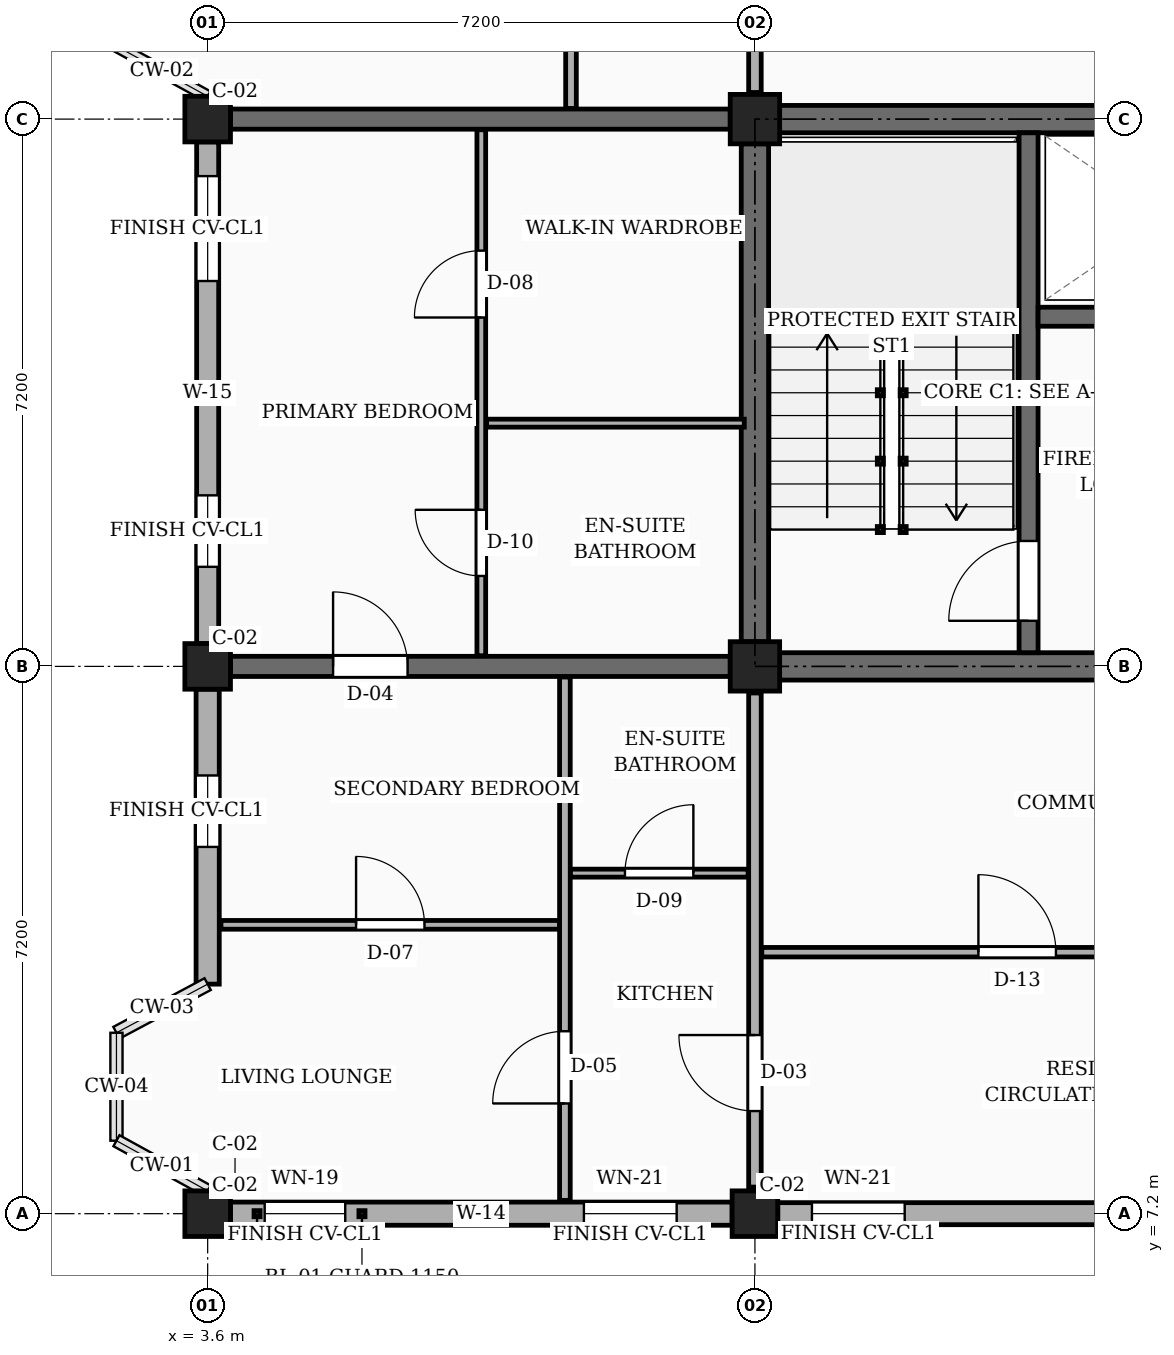
"""IFC4 building model, lengths in metres.
Left out: names, types, materials, properties, quantities, classifications, styles, units other than length and angle.
Written with IfcOpenShell. Run it as: python <this file> out.ifc"""

import sys

from ifc_helpers import new_model, si_unit, direction, frame, frame_2d, origin, origin_2d, place, context, subcontext, project, spatial, rectangle, extrude, element, fill, save


model = new_model("IFC4")
c1 = context("Model", 3, precision=1e-05, world=origin(), true_north=direction((0.0, 1.0)))
c2 = subcontext(c1, "Body", "Model", "MODEL_VIEW")
j1 = project(units=[si_unit("LENGTHUNIT", "METRE"), si_unit("PLANEANGLEUNIT", "RADIAN")], contexts=[c1])
p1 = place(None, origin())
s1 = spatial("IfcSite", under=j1, at=p1, CompositionType="ELEMENT")
p2 = place(p1, origin())
s2 = spatial("IfcBuilding", under=s1, at=p2, CompositionType="ELEMENT")
p3 = place(p2, frame((0.0, 0.0, 7.65)))
s3 = spatial("IfcBuildingStorey", under=s2, at=p3, CompositionType="ELEMENT", Elevation=7.65)
for number, where, z_axis, x_axis in (
    (1, (3.6, 7.2, 0.0), (0.0, 0.0, 1.0), (1.0, 0.0, 0.0)),
    (2, (3.6, 14.4, 0.0), (0.0, 0.0, 1.0), (1.0, 0.0, 0.0)),
    (3, (3.6, 21.6, 0.0), (0.0, 0.0, 1.0), (1.0, 0.0, 0.0)),
    (4, (10.8, 7.2, 0.0), (0.0, 0.0, 1.0), (1.0, 0.0, 0.0)),
):
    element("IfcColumn", number, at=place(p3, frame(where, z_axis=z_axis, x_axis=x_axis)), inside=s3, PredefinedType="COLUMN", context=c2, shape_type="SweptSolid", body=[
        extrude(rectangle(XDim=0.6, YDim=0.6, at=origin_2d()), origin(), (0.0, 0.0, 1.0), 3.15),
    ])
for number, where, z_axis, x_axis in (
    (5, (10.8, 14.4, 0.0), (0.0, 0.0, 1.0), (1.0, 0.0, 0.0)),
    (6, (10.8, 21.6, 0.0), (0.0, 0.0, 1.0), (1.0, 0.0, 0.0)),
):
    element("IfcColumn", number, at=place(p3, frame(where, z_axis=z_axis, x_axis=x_axis)), inside=s3, PredefinedType="COLUMN", context=c2, shape_type="SweptSolid", body=[
        extrude(rectangle(XDim=0.65, YDim=0.65, at=origin_2d()), origin(), (0.0, 0.0, 1.0), 3.15),
    ])
p4 = place(p3, frame((3.9, 14.4, 0.0), z_axis=(0.0, 0.0, 1.0), x_axis=(1.0, 0.0, 0.0)))
e7 = element("IfcWall", 7, at=p4, inside=s3, PredefinedType="SOLIDWALL", context=c2, shape_type="SweptSolid", body=[
    extrude(rectangle(XDim=6.575, YDim=0.265, at=frame_2d((3.288, 0.0))), origin(), (0.0, 0.0, 1.0), 2.17),
])
p5 = place(p4, frame((1.35, 0.0, 0.0)))
e8 = element("IfcOpeningElement", 8, at=p5, cuts=e7, PredefinedType="OPENING", context=c2, shape_type="SweptSolid", body=[
    extrude(rectangle(XDim=0.98, YDim=2.12, at=frame_2d((0.49, 1.06))), frame((0.0, 0.143, 0.0), z_axis=(0.0, -1.0, 0.0), x_axis=(1.0, 0.0, 0.0)), (0.0, 0.0, 1.0), 0.285),
])
p6 = place(p3, frame((3.9, 21.6, 0.0), z_axis=(0.0, 0.0, 1.0), x_axis=(1.0, 0.0, 0.0)))
e9 = element("IfcWall", 9, at=p6, inside=s3, PredefinedType="SOLIDWALL", context=c2, shape_type="SweptSolid", body=[
    extrude(rectangle(XDim=6.575, YDim=0.265, at=frame_2d((3.288, 0.0))), origin(), (0.0, 0.0, 1.0), 2.17),
])
p7 = place(p3, frame((3.9, 7.2, 0.0), z_axis=(0.0, 0.0, 1.0), x_axis=(1.0, 0.0, 0.0)))
e10 = element("IfcWall", 10, at=p7, inside=s3, PredefinedType="SOLIDWALL", context=c2, shape_type="SweptSolid", body=[
    extrude(rectangle(XDim=6.6, YDim=0.305, at=frame_2d((3.3, 0.0))), origin(), (0.0, 0.0, 1.0), 2.44),
])
p8 = place(p7, frame((0.45, 0.0, 0.78)))
e11 = element("IfcOpeningElement", 11, at=p8, cuts=e10, PredefinedType="OPENING", context=c2, shape_type="SweptSolid", body=[
    extrude(rectangle(XDim=1.06, YDim=1.36, at=frame_2d((0.53, 0.68))), frame((0.0, 0.163, 0.0), z_axis=(0.0, -1.0, 0.0), x_axis=(1.0, 0.0, 0.0)), (0.0, 0.0, 1.0), 0.325),
])
p9 = place(p7, frame((4.65, 0.0, 0.78)))
e12 = element("IfcOpeningElement", 12, at=p9, cuts=e10, PredefinedType="OPENING", context=c2, shape_type="SweptSolid", body=[
    extrude(rectangle(XDim=1.22, YDim=1.36, at=frame_2d((0.61, 0.68))), frame((0.0, 0.163, 0.0), z_axis=(0.0, -1.0, 0.0), x_axis=(1.0, 0.0, 0.0)), (0.0, 0.0, 1.0), 0.325),
])
p10 = place(p3, frame((11.1, 7.2, 0.0), z_axis=(0.0, 0.0, 1.0), x_axis=(1.0, 0.0, 0.0)))
e13 = element("IfcWall", 13, at=p10, inside=s3, PredefinedType="SOLIDWALL", context=c2, shape_type="SweptSolid", body=[
    extrude(rectangle(XDim=6.6, YDim=0.29, at=frame_2d((3.3, 0.0))), origin(), (0.0, 0.0, 1.0), 2.44),
])
p11 = place(p10, frame((0.45, 0.0, 0.78)))
e14 = element("IfcOpeningElement", 14, at=p11, cuts=e13, PredefinedType="OPENING", context=c2, shape_type="SweptSolid", body=[
    extrude(rectangle(XDim=1.22, YDim=1.36, at=frame_2d((0.61, 0.68))), frame((0.0, 0.155, 0.0), z_axis=(0.0, -1.0, 0.0), x_axis=(1.0, 0.0, 0.0)), (0.0, 0.0, 1.0), 0.31),
])
p12 = place(p10, frame((4.65, 0.0, 0.78)))
e15 = element("IfcOpeningElement", 15, at=p12, cuts=e13, PredefinedType="OPENING", context=c2, shape_type="SweptSolid", body=[
    extrude(rectangle(XDim=1.38, YDim=1.36, at=frame_2d((0.69, 0.68))), frame((0.0, 0.155, 0.0), z_axis=(0.0, -1.0, 0.0), x_axis=(1.0, 0.0, 0.0)), (0.0, 0.0, 1.0), 0.31),
])
p13 = place(p3, frame((3.6, 21.3, 0.0), z_axis=(0.0, 0.0, 1.0), x_axis=(0.0, -1.0, 0.0)))
e16 = element("IfcWall", 16, at=p13, inside=s3, PredefinedType="SOLIDWALL", context=c2, shape_type="SweptSolid", body=[
    extrude(rectangle(XDim=6.6, YDim=0.29, at=frame_2d((3.3, 0.0))), origin(), (0.0, 0.0, 1.0), 2.44),
])
p14 = place(p13, frame((0.45, 0.0, 0.78)))
e17 = element("IfcOpeningElement", 17, at=p14, cuts=e16, PredefinedType="OPENING", context=c2, shape_type="SweptSolid", body=[
    extrude(rectangle(XDim=1.38, YDim=1.36, at=frame_2d((0.69, 0.68))), frame((0.0, 0.155, 0.0), z_axis=(0.0, -1.0, 0.0), x_axis=(1.0, 0.0, 0.0)), (0.0, 0.0, 1.0), 0.31),
])
p15 = place(p13, frame((4.65, 0.0, 0.78)))
e18 = element("IfcOpeningElement", 18, at=p15, cuts=e16, PredefinedType="OPENING", context=c2, shape_type="SweptSolid", body=[
    extrude(rectangle(XDim=0.94, YDim=1.44, at=frame_2d((0.47, 0.72))), frame((0.0, 0.155, 0.0), z_axis=(0.0, -1.0, 0.0), x_axis=(1.0, 0.0, 0.0)), (0.0, 0.0, 1.0), 0.31),
])
p16 = place(p3, frame((3.6, 14.1, 0.0), z_axis=(0.0, 0.0, 1.0), x_axis=(0.0, -1.0, 0.0)))
e19 = element("IfcWall", 19, at=p16, inside=s3, PredefinedType="SOLIDWALL", context=c2, shape_type="SweptSolid", body=[
    extrude(rectangle(XDim=3.88, YDim=0.305, at=frame_2d((1.94, 0.0))), origin(), (0.0, 0.0, 1.0), 2.44),
])
p17 = place(p16, frame((1.135, 0.0, 0.78)))
e20 = element("IfcOpeningElement", 20, at=p17, cuts=e19, PredefinedType="OPENING", context=c2, shape_type="SweptSolid", body=[
    extrude(rectangle(XDim=0.94, YDim=1.44, at=frame_2d((0.47, 0.72))), frame((0.0, 0.163, 0.0), z_axis=(0.0, -1.0, 0.0), x_axis=(1.0, 0.0, 0.0)), (0.0, 0.0, 1.0), 0.325),
])
p18 = place(p3, frame((10.8, 14.725, 0.0), z_axis=(0.0, 0.0, 1.0), x_axis=(0.0, 1.0, 0.0)))
e21 = element("IfcWall", 21, at=p18, inside=s3, PredefinedType="SHEAR", context=c2, shape_type="SweptSolid", body=[
    extrude(rectangle(XDim=6.55, YDim=0.36, at=frame_2d((3.275, 0.0))), origin(), (0.0, 0.0, 1.0), 2.87),
])
for number, where, z_axis, x_axis in (
    (22, (11.125, 21.6, 0.0), (0.0, 0.0, 1.0), (1.0, 0.0, 0.0)),
    (23, (11.125, 14.4, 0.0), (0.0, 0.0, 1.0), (1.0, 0.0, 0.0)),
):
    element("IfcWall", number, at=place(p3, frame(where, z_axis=z_axis, x_axis=x_axis)), inside=s3, PredefinedType="SHEAR", context=c2, shape_type="SweptSolid", body=[
        extrude(rectangle(XDim=6.55, YDim=0.36, at=frame_2d((3.275, 0.0))), origin(), (0.0, 0.0, 1.0), 2.87),
    ])
p19 = place(p3, frame((14.4, 14.58, 0.0), z_axis=(0.0, 0.0, 1.0), x_axis=(0.0, 1.0, 0.0)))
e24 = element("IfcWall", 24, at=p19, inside=s3, PredefinedType="SHEAR", context=c2, shape_type="SweptSolid", body=[
    extrude(rectangle(XDim=6.84, YDim=0.25, at=frame_2d((3.42, 0.0))), origin(), (0.0, 0.0, 1.0), 2.87),
])
p20 = place(p19, frame((0.42, 0.0, 0.0)))
e25 = element("IfcOpeningElement", 25, at=p20, cuts=e24, PredefinedType="OPENING", context=c2, shape_type="SweptSolid", body=[
    extrude(rectangle(XDim=1.05, YDim=2.15, at=frame_2d((0.525, 1.075))), frame((0.0, 0.135, 0.0), z_axis=(0.0, -1.0, 0.0), x_axis=(1.0, 0.0, 0.0)), (0.0, 0.0, 1.0), 0.27),
])
p21 = place(p3, frame((14.525, 19.0, 0.0), z_axis=(0.0, 0.0, 1.0), x_axis=(1.0, 0.0, 0.0)))
e26 = element("IfcWall", 26, at=p21, inside=s3, PredefinedType="SHEAR", context=c2, shape_type="SweptSolid", body=[
    extrude(rectangle(XDim=3.295, YDim=0.25, at=frame_2d((1.647, 0.0))), origin(), (0.0, 0.0, 1.0), 2.87),
])
p22 = place(p21, frame((1.1, 0.0, 0.0)))
e27 = element("IfcOpeningElement", 27, at=p22, cuts=e26, PredefinedType="OPENING", context=c2, shape_type="SweptSolid", body=[
    extrude(rectangle(XDim=1.1, YDim=2.2, at=frame_2d((0.55, 1.1))), frame((0.0, 0.135, 0.0), z_axis=(0.0, -1.0, 0.0), x_axis=(1.0, 0.0, 0.0)), (0.0, 0.0, 1.0), 0.27),
])
p23 = place(p3, frame((10.8, 7.55, 0.0), z_axis=(0.0, 0.0, 1.0), x_axis=(0.0, 1.0, 0.0)))
e28 = element("IfcWall", 28, at=p23, inside=s3, PredefinedType="PARTITIONING", context=c2, shape_type="SweptSolid", body=[
    extrude(rectangle(XDim=6.5, YDim=0.165, at=frame_2d((3.25, 0.0))), origin(), (0.0, 0.0, 1.0), 2.22),
])
p24 = place(p23, frame((1.0, 0.0, 0.0)))
e29 = element("IfcOpeningElement", 29, at=p24, cuts=e28, PredefinedType="OPENING", context=c2, shape_type="SweptSolid", body=[
    extrude(rectangle(XDim=1.0, YDim=2.15, at=frame_2d((0.5, 1.075))), frame((0.0, 0.093, 0.0), z_axis=(0.0, -1.0, 0.0), x_axis=(1.0, 0.0, 0.0)), (0.0, 0.0, 1.0), 0.185),
])
p25 = place(p3, frame((10.8, 21.95, 0.0), z_axis=(0.0, 0.0, 1.0), x_axis=(0.0, 1.0, 0.0)))
e30 = element("IfcWall", 30, at=p25, inside=s3, PredefinedType="PARTITIONING", context=c2, shape_type="SweptSolid", body=[
    extrude(rectangle(XDim=6.5, YDim=0.165, at=frame_2d((3.25, 0.0))), origin(), (0.0, 0.0, 1.0), 2.22),
])
p26 = place(p25, frame((1.0, 0.0, 0.0)))
e31 = element("IfcOpeningElement", 31, at=p26, cuts=e30, PredefinedType="OPENING", context=c2, shape_type="SweptSolid", body=[
    extrude(rectangle(XDim=0.94, YDim=2.12, at=frame_2d((0.47, 1.06))), frame((0.0, 0.093, 0.0), z_axis=(0.0, -1.0, 0.0), x_axis=(1.0, 0.0, 0.0)), (0.0, 0.0, 1.0), 0.185),
])
p27 = place(p3, frame((10.89, 10.64, 0.0), z_axis=(0.0, 0.0, 1.0), x_axis=(1.0, 0.0, 0.0)))
e32 = element("IfcWall", 32, at=p27, inside=s3, PredefinedType="PARTITIONING", context=c2, shape_type="SweptSolid", body=[
    extrude(rectangle(XDim=7.02, YDim=0.125, at=frame_2d((3.51, 0.0))), origin(), (0.0, 0.0, 1.0), 2.305),
])
p28 = place(p27, frame((2.85, 0.0, 0.0)))
e33 = element("IfcOpeningElement", 33, at=p28, cuts=e32, PredefinedType="OPENING", context=c2, shape_type="SweptSolid", body=[
    extrude(rectangle(XDim=1.02, YDim=2.15, at=frame_2d((0.51, 1.075))), frame((0.0, 0.073, 0.0), z_axis=(0.0, -1.0, 0.0), x_axis=(1.0, 0.0, 0.0)), (0.0, 0.0, 1.0), 0.145),
])
p29 = place(p3, frame((3.775, 11.0, 0.0), z_axis=(0.0, 0.0, 1.0), x_axis=(1.0, 0.0, 0.0)))
e34 = element("IfcWall", 34, at=p29, inside=s3, PredefinedType="PARTITIONING", context=c2, shape_type="SweptSolid", body=[
    extrude(rectangle(XDim=4.455, YDim=0.115, at=frame_2d((2.228, 0.0))), origin(), (0.0, 0.0, 1.0), 2.305),
])
p30 = place(p29, frame((1.778, 0.0, 0.0)))
e35 = element("IfcOpeningElement", 35, at=p30, cuts=e34, PredefinedType="OPENING", context=c2, shape_type="SweptSolid", body=[
    extrude(rectangle(XDim=0.9, YDim=2.1, at=frame_2d((0.45, 1.05))), frame((0.0, 0.067, 0.0), z_axis=(0.0, -1.0, 0.0), x_axis=(1.0, 0.0, 0.0)), (0.0, 0.0, 1.0), 0.135),
])
p31 = place(p3, frame((8.37, 11.68, 0.0), z_axis=(0.0, 0.0, 1.0), x_axis=(1.0, 0.0, 0.0)))
e36 = element("IfcWall", 36, at=p31, inside=s3, PredefinedType="PARTITIONING", context=c2, shape_type="SweptSolid", body=[
    extrude(rectangle(XDim=2.34, YDim=0.105, at=frame_2d((1.17, 0.0))), origin(), (0.0, 0.0, 1.0), 2.305),
])
p32 = place(p31, frame((0.72, 0.0, 0.0)))
e37 = element("IfcOpeningElement", 37, at=p32, cuts=e36, PredefinedType="OPENING", context=c2, shape_type="SweptSolid", body=[
    extrude(rectangle(XDim=0.9, YDim=2.05, at=frame_2d((0.45, 1.025))), frame((0.0, 0.062, 0.0), z_axis=(0.0, -1.0, 0.0), x_axis=(1.0, 0.0, 0.0)), (0.0, 0.0, 1.0), 0.125),
])
p33 = place(p3, frame((8.3, 7.375, 0.0), z_axis=(0.0, 0.0, 1.0), x_axis=(0.0, 1.0, 0.0)))
e38 = element("IfcWall", 38, at=p33, inside=s3, PredefinedType="PARTITIONING", context=c2, shape_type="SweptSolid", body=[
    extrude(rectangle(XDim=6.885, YDim=0.14, at=frame_2d((3.442, 0.0))), origin(), (0.0, 0.0, 1.0), 2.305),
])
p34 = place(p33, frame((1.275, 0.0, 0.0)))
e39 = element("IfcOpeningElement", 39, at=p34, cuts=e38, PredefinedType="OPENING", context=c2, shape_type="SweptSolid", body=[
    extrude(rectangle(XDim=0.95, YDim=2.1, at=frame_2d((0.475, 1.05))), frame((0.0, 0.08, 0.0), z_axis=(0.0, -1.0, 0.0), x_axis=(1.0, 0.0, 0.0)), (0.0, 0.0, 1.0), 0.16),
])
p35 = place(p3, frame((7.2, 14.54, 0.0), z_axis=(0.0, 0.0, 1.0), x_axis=(0.0, 1.0, 0.0)))
e40 = element("IfcWall", 40, at=p35, inside=s3, PredefinedType="PARTITIONING", context=c2, shape_type="SweptSolid", body=[
    extrude(rectangle(XDim=6.92, YDim=0.115, at=frame_2d((3.46, 0.0))), origin(), (0.0, 0.0, 1.0), 2.305),
])
p36 = place(p35, frame((1.05, 0.0, 0.0)))
e41 = element("IfcOpeningElement", 41, at=p36, cuts=e40, PredefinedType="OPENING", context=c2, shape_type="SweptSolid", body=[
    extrude(rectangle(XDim=0.87, YDim=2.05, at=frame_2d((0.435, 1.025))), frame((0.0, 0.067, 0.0), z_axis=(0.0, -1.0, 0.0), x_axis=(1.0, 0.0, 0.0)), (0.0, 0.0, 1.0), 0.135),
])
p37 = place(p35, frame((4.45, 0.0, 0.0)))
e42 = element("IfcOpeningElement", 42, at=p37, cuts=e40, PredefinedType="OPENING", context=c2, shape_type="SweptSolid", body=[
    extrude(rectangle(XDim=0.88, YDim=2.08, at=frame_2d((0.44, 1.04))), frame((0.0, 0.067, 0.0), z_axis=(0.0, -1.0, 0.0), x_axis=(1.0, 0.0, 0.0)), (0.0, 0.0, 1.0), 0.135),
])
p38 = place(p3, frame((7.27, 17.6, 0.0), z_axis=(0.0, 0.0, 1.0), x_axis=(1.0, 0.0, 0.0)))
e43 = element("IfcWall", 43, at=p38, inside=s3, PredefinedType="PARTITIONING", context=c2, shape_type="SweptSolid", body=[
    extrude(rectangle(XDim=3.39, YDim=0.105, at=frame_2d((1.695, 0.0))), origin(), (0.0, 0.0, 1.0), 2.305),
])
p39 = place(p3, frame((8.38, 21.74, 0.0), z_axis=(0.0, 0.0, 1.0), x_axis=(0.0, 1.0, 0.0)))
e44 = element("IfcWall", 44, at=p39, inside=s3, PredefinedType="PARTITIONING", context=c2, shape_type="SweptSolid", body=[
    extrude(rectangle(XDim=6.92, YDim=0.14, at=frame_2d((3.46, 0.0))), origin(), (0.0, 0.0, 1.0), 2.305),
])
p40 = place(p39, frame((1.31, 0.0, 0.0)))
e45 = element("IfcOpeningElement", 45, at=p40, cuts=e44, PredefinedType="OPENING", context=c2, shape_type="SweptSolid", body=[
    extrude(rectangle(XDim=0.92, YDim=2.1, at=frame_2d((0.46, 1.05))), frame((0.0, 0.08, 0.0), z_axis=(0.0, -1.0, 0.0), x_axis=(1.0, 0.0, 0.0)), (0.0, 0.0, 1.0), 0.16),
])
p41 = place(p8, origin())
e46 = element("IfcWindow", 46, at=p41, inside=s3, PartitioningType="SINGLE_PANEL", PredefinedType="WINDOW", context=c2, shape_type="SweptSolid", body=[
    extrude(rectangle(XDim=1.06, YDim=1.36, at=frame_2d((0.53, 0.68))), frame((0.0, 0.03, 0.0), z_axis=(0.0, -1.0, 0.0), x_axis=(1.0, 0.0, 0.0)), (0.0, 0.0, 1.0), 0.06),
])
fill(e11, e46)
p42 = place(p9, origin())
e47 = element("IfcWindow", 47, at=p42, inside=s3, PartitioningType="SINGLE_PANEL", PredefinedType="WINDOW", context=c2, shape_type="SweptSolid", body=[
    extrude(rectangle(XDim=1.22, YDim=1.36, at=frame_2d((0.61, 0.68))), frame((0.0, 0.03, 0.0), z_axis=(0.0, -1.0, 0.0), x_axis=(1.0, 0.0, 0.0)), (0.0, 0.0, 1.0), 0.06),
])
fill(e12, e47)
p43 = place(p11, origin())
e48 = element("IfcWindow", 48, at=p43, inside=s3, PartitioningType="SINGLE_PANEL", PredefinedType="WINDOW", context=c2, shape_type="SweptSolid", body=[
    extrude(rectangle(XDim=1.22, YDim=1.36, at=frame_2d((0.61, 0.68))), frame((0.0, 0.03, 0.0), z_axis=(0.0, -1.0, 0.0), x_axis=(1.0, 0.0, 0.0)), (0.0, 0.0, 1.0), 0.06),
])
fill(e14, e48)
p44 = place(p14, origin())
e49 = element("IfcWindow", 49, at=p44, inside=s3, PartitioningType="SINGLE_PANEL", PredefinedType="WINDOW", context=c2, shape_type="SweptSolid", body=[
    extrude(rectangle(XDim=1.38, YDim=1.36, at=frame_2d((0.69, 0.68))), frame((0.0, 0.03, 0.0), z_axis=(0.0, -1.0, 0.0), x_axis=(1.0, 0.0, 0.0)), (0.0, 0.0, 1.0), 0.06),
])
fill(e17, e49)
p45 = place(p15, origin())
e50 = element("IfcWindow", 50, at=p45, inside=s3, PartitioningType="SINGLE_PANEL", PredefinedType="WINDOW", context=c2, shape_type="SweptSolid", body=[
    extrude(rectangle(XDim=0.94, YDim=1.44, at=frame_2d((0.47, 0.72))), frame((0.0, 0.03, 0.0), z_axis=(0.0, -1.0, 0.0), x_axis=(1.0, 0.0, 0.0)), (0.0, 0.0, 1.0), 0.06),
])
fill(e18, e50)
p46 = place(p17, origin())
e51 = element("IfcWindow", 51, at=p46, inside=s3, PartitioningType="SINGLE_PANEL", PredefinedType="WINDOW", context=c2, shape_type="SweptSolid", body=[
    extrude(rectangle(XDim=0.94, YDim=1.44, at=frame_2d((0.47, 0.72))), frame((0.0, 0.03, 0.0), z_axis=(0.0, -1.0, 0.0), x_axis=(1.0, 0.0, 0.0)), (0.0, 0.0, 1.0), 0.06),
])
fill(e20, e51)
p47 = place(p20, origin())
e52 = element("IfcDoor", 52, at=p47, inside=s3, OperationType="SINGLE_SWING_LEFT", PredefinedType="DOOR", context=c2, shape_type="SweptSolid", body=[
    extrude(rectangle(XDim=1.05, YDim=2.15, at=frame_2d((0.525, 1.075))), frame((0.0, 0.025, 0.0), z_axis=(0.0, -1.0, 0.0), x_axis=(1.0, 0.0, 0.0)), (0.0, 0.0, 1.0), 0.05),
])
fill(e25, e52)
p48 = place(p24, origin())
e53 = element("IfcDoor", 53, at=p48, inside=s3, OperationType="SINGLE_SWING_RIGHT", PredefinedType="DOOR", context=c2, shape_type="SweptSolid", body=[
    extrude(rectangle(XDim=1.0, YDim=2.15, at=frame_2d((0.5, 1.075))), frame((0.0, 0.025, 0.0), z_axis=(0.0, -1.0, 0.0), x_axis=(1.0, 0.0, 0.0)), (0.0, 0.0, 1.0), 0.05),
])
fill(e29, e53)
p49 = place(p28, origin())
e54 = element("IfcDoor", 54, at=p49, inside=s3, OperationType="SINGLE_SWING_LEFT", PredefinedType="DOOR", context=c2, shape_type="SweptSolid", body=[
    extrude(rectangle(XDim=1.02, YDim=2.15, at=frame_2d((0.51, 1.075))), frame((0.0, 0.025, 0.0), z_axis=(0.0, -1.0, 0.0), x_axis=(1.0, 0.0, 0.0)), (0.0, 0.0, 1.0), 0.05),
])
fill(e33, e54)
p50 = place(p30, origin())
e55 = element("IfcDoor", 55, at=p50, inside=s3, OperationType="SINGLE_SWING_LEFT", PredefinedType="DOOR", context=c2, shape_type="SweptSolid", body=[
    extrude(rectangle(XDim=0.9, YDim=2.1, at=frame_2d((0.45, 1.05))), frame((0.0, 0.025, 0.0), z_axis=(0.0, -1.0, 0.0), x_axis=(1.0, 0.0, 0.0)), (0.0, 0.0, 1.0), 0.05),
])
fill(e35, e55)
p51 = place(p32, origin())
e56 = element("IfcDoor", 56, at=p51, inside=s3, OperationType="SINGLE_SWING_RIGHT", PredefinedType="DOOR", context=c2, shape_type="SweptSolid", body=[
    extrude(rectangle(XDim=0.9, YDim=2.05, at=frame_2d((0.45, 1.025))), frame((0.0, 0.025, 0.0), z_axis=(0.0, -1.0, 0.0), x_axis=(1.0, 0.0, 0.0)), (0.0, 0.0, 1.0), 0.05),
])
fill(e37, e56)
p52 = place(p34, origin())
e57 = element("IfcDoor", 57, at=p52, inside=s3, OperationType="SINGLE_SWING_LEFT", PredefinedType="DOOR", context=c2, shape_type="SweptSolid", body=[
    extrude(rectangle(XDim=0.95, YDim=2.1, at=frame_2d((0.475, 1.05))), frame((0.0, 0.025, 0.0), z_axis=(0.0, -1.0, 0.0), x_axis=(1.0, 0.0, 0.0)), (0.0, 0.0, 1.0), 0.05),
])
fill(e39, e57)
p53 = place(p36, origin())
e58 = element("IfcDoor", 58, at=p53, inside=s3, OperationType="SINGLE_SWING_RIGHT", PredefinedType="DOOR", context=c2, shape_type="SweptSolid", body=[
    extrude(rectangle(XDim=0.87, YDim=2.05, at=frame_2d((0.435, 1.025))), frame((0.0, 0.025, 0.0), z_axis=(0.0, -1.0, 0.0), x_axis=(1.0, 0.0, 0.0)), (0.0, 0.0, 1.0), 0.05),
])
fill(e41, e58)
p54 = place(p37, origin())
e59 = element("IfcDoor", 59, at=p54, inside=s3, OperationType="SINGLE_SWING_LEFT", PredefinedType="DOOR", context=c2, shape_type="SweptSolid", body=[
    extrude(rectangle(XDim=0.88, YDim=2.08, at=frame_2d((0.44, 1.04))), frame((0.0, 0.025, 0.0), z_axis=(0.0, -1.0, 0.0), x_axis=(1.0, 0.0, 0.0)), (0.0, 0.0, 1.0), 0.05),
])
fill(e42, e59)
p55 = place(p5, origin())
e60 = element("IfcDoor", 60, at=p55, inside=s3, OperationType="SINGLE_SWING_LEFT", PredefinedType="DOOR", context=c2, shape_type="SweptSolid", body=[
    extrude(rectangle(XDim=0.98, YDim=2.12, at=frame_2d((0.49, 1.06))), frame((0.0, 0.025, 0.0), z_axis=(0.0, -1.0, 0.0), x_axis=(1.0, 0.0, 0.0)), (0.0, 0.0, 1.0), 0.05),
])
fill(e8, e60)
save(model, sys.argv[1])
